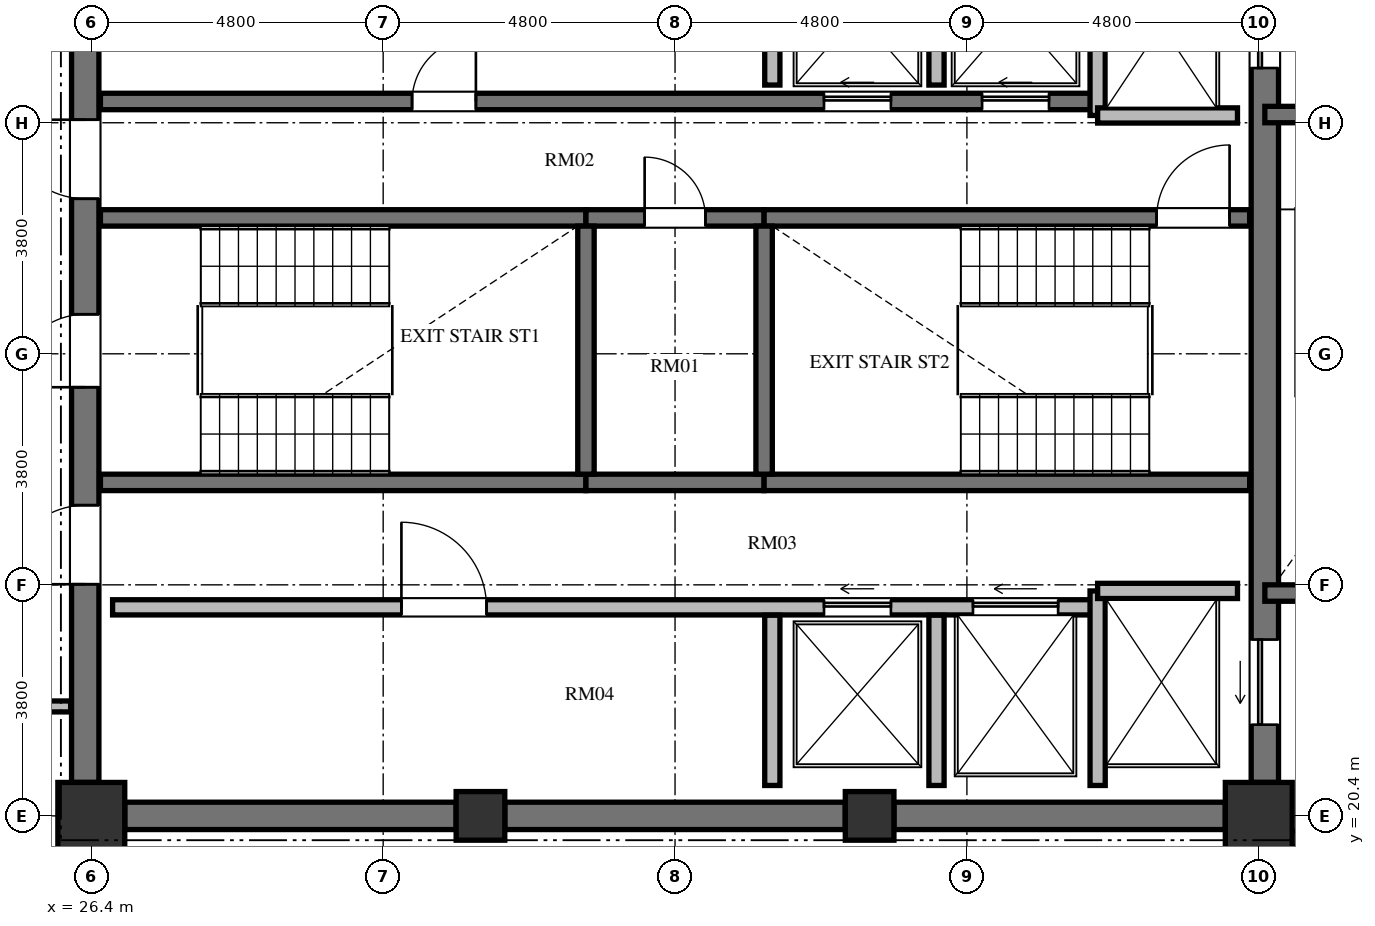
"""IFC4 building model, lengths in metres.
Left out: names, types, materials, properties, quantities, classifications, styles, units other than length and angle.
Written with IfcOpenShell. Run it as: python <this file> out.ifc"""

import sys

from ifc_helpers import new_model, si_unit, direction, frame, frame_2d, origin, origin_2d, place, context, subcontext, project, spatial, rectangle, extrude, element, fill, save


model = new_model("IFC4")
c1 = context("Model", 3, precision=1e-05, world=origin(), true_north=direction((0.0, 1.0)))
c2 = subcontext(c1, "Body", "Model", "MODEL_VIEW")
j1 = project(units=[si_unit("LENGTHUNIT", "METRE"), si_unit("PLANEANGLEUNIT", "RADIAN")], contexts=[c1])
p1 = place(None, origin())
s1 = spatial("IfcSite", under=j1, at=p1, CompositionType="ELEMENT")
p2 = place(p1, origin())
s2 = spatial("IfcBuilding", under=s1, at=p2, CompositionType="ELEMENT")
p3 = place(p2, frame((0.0, 0.0, 287.856)))
s3 = spatial("IfcBuildingStorey", under=s2, at=p3, CompositionType="ELEMENT", Elevation=287.856)
p4 = place(p3, frame((26.4, 20.4, 0.0), z_axis=(0.0, 0.0, 1.0), x_axis=(1.0, 0.0, 0.0)))
e1 = element("IfcColumn", 1, at=p4, inside=s3, PredefinedType="COLUMN", context=c2, shape_type="SweptSolid", body=[
    extrude(rectangle(XDim=1.1, YDim=1.1, at=origin_2d()), origin(), (0.0, 0.0, 1.0), 3.648),
])
for number, where, z_axis, x_axis in (
    (2, (32.8, 20.4, 0.0), (0.0, 0.0, 1.0), (1.0, 0.0, 0.0)),
    (3, (39.2, 20.4, 0.0), (0.0, 0.0, 1.0), (1.0, 0.0, 0.0)),
):
    element("IfcColumn", number, at=place(p3, frame(where, z_axis=z_axis, x_axis=x_axis)), inside=s3, PredefinedType="COLUMN", context=c2, shape_type="SweptSolid", body=[
        extrude(rectangle(XDim=0.8, YDim=0.8, at=origin_2d()), origin(), (0.0, 0.0, 1.0), 3.648),
    ])
p5 = place(p3, frame((45.6, 20.4, 0.0), z_axis=(0.0, 0.0, 1.0), x_axis=(1.0, 0.0, 0.0)))
e4 = element("IfcColumn", 4, at=p5, inside=s3, PredefinedType="COLUMN", context=c2, shape_type="SweptSolid", body=[
    extrude(rectangle(XDim=1.1, YDim=1.1, at=origin_2d()), origin(), (0.0, 0.0, 1.0), 3.648),
])
p6 = place(p3, frame((26.3, 20.95, 0.0), z_axis=(0.0, 0.0, 1.0), x_axis=(0.0, 1.0, 0.0)))
e5 = element("IfcWall", 5, at=p6, inside=s3, PredefinedType="SHEAR", context=c2, shape_type="SweptSolid", body=[
    extrude(rectangle(XDim=14.1, YDim=0.45, at=frame_2d((7.05, 0.0))), origin(), (0.0, 0.0, 1.0), 3.648),
])
p7 = place(p6, frame((6.5, 0.0, 0.0)))
e6 = element("IfcOpeningElement", 6, at=p7, cuts=e5, PredefinedType="OPENING", context=c2, shape_type="SweptSolid", body=[
    extrude(rectangle(XDim=1.2, YDim=2.15, at=frame_2d((0.6, 1.075))), frame((0.0, 0.235, 0.0), z_axis=(0.0, -1.0, 0.0), x_axis=(1.0, 0.0, 0.0)), (0.0, 0.0, 1.0), 0.47),
])
p8 = place(p6, frame((9.6, 0.0, 0.0)))
e7 = element("IfcOpeningElement", 7, at=p8, cuts=e5, PredefinedType="OPENING", context=c2, shape_type="SweptSolid", body=[
    extrude(rectangle(XDim=1.3, YDim=2.2, at=frame_2d((0.65, 1.1))), frame((0.0, 0.235, 0.0), z_axis=(0.0, -1.0, 0.0), x_axis=(1.0, 0.0, 0.0)), (0.0, 0.0, 1.0), 0.47),
])
p9 = place(p6, frame((3.26, 0.0, 0.0)))
e8 = element("IfcOpeningElement", 8, at=p9, cuts=e5, PredefinedType="OPENING", context=c2, shape_type="SweptSolid", body=[
    extrude(rectangle(XDim=1.3, YDim=2.2, at=frame_2d((0.65, 1.1))), frame((0.0, 0.235, 0.0), z_axis=(0.0, -1.0, 0.0), x_axis=(1.0, 0.0, 0.0)), (0.0, 0.0, 1.0), 0.47),
])
p10 = place(p3, frame((45.7, 20.95, 0.0), z_axis=(0.0, 0.0, 1.0), x_axis=(0.0, 1.0, 0.0)))
e9 = element("IfcWall", 9, at=p10, inside=s3, PredefinedType="SHEAR", context=c2, shape_type="SweptSolid", body=[
    extrude(rectangle(XDim=14.1, YDim=0.45, at=frame_2d((7.05, 0.0))), origin(), (0.0, 0.0, 1.0), 3.648),
])
p11 = place(p10, frame((11.75, 0.0, 0.0)))
e10 = element("IfcOpeningElement", 10, at=p11, cuts=e9, PredefinedType="OPENING", context=c2, shape_type="SweptSolid", body=[
    extrude(rectangle(XDim=1.4, YDim=2.3, at=frame_2d((0.7, 1.15))), frame((0.0, 0.235, 0.0), z_axis=(0.0, -1.0, 0.0), x_axis=(1.0, 0.0, 0.0)), (0.0, 0.0, 1.0), 0.47),
])
p12 = place(p10, frame((0.95, 0.0, 0.0)))
e11 = element("IfcOpeningElement", 11, at=p12, cuts=e9, PredefinedType="OPENING", context=c2, shape_type="SweptSolid", body=[
    extrude(rectangle(XDim=1.4, YDim=2.3, at=frame_2d((0.7, 1.15))), frame((0.0, 0.235, 0.0), z_axis=(0.0, -1.0, 0.0), x_axis=(1.0, 0.0, 0.0)), (0.0, 0.0, 1.0), 0.47),
])
p13 = place(p3, frame((26.95, 20.4, 0.0), z_axis=(0.0, 0.0, 1.0), x_axis=(1.0, 0.0, 0.0)))
e12 = element("IfcWall", 12, at=p13, inside=s3, PredefinedType="SHEAR", context=c2, shape_type="SweptSolid", body=[
    extrude(rectangle(XDim=5.45, YDim=0.45, at=frame_2d((2.725, 0.0))), origin(), (0.0, 0.0, 1.0), 3.648),
])
p14 = place(p3, frame((33.2, 20.4, 0.0), z_axis=(0.0, 0.0, 1.0), x_axis=(1.0, 0.0, 0.0)))
e13 = element("IfcWall", 13, at=p14, inside=s3, PredefinedType="SHEAR", context=c2, shape_type="SweptSolid", body=[
    extrude(rectangle(XDim=5.6, YDim=0.45, at=frame_2d((2.8, 0.0))), origin(), (0.0, 0.0, 1.0), 3.648),
])
p15 = place(p3, frame((39.6, 20.4, 0.0), z_axis=(0.0, 0.0, 1.0), x_axis=(1.0, 0.0, 0.0)))
e14 = element("IfcWall", 14, at=p15, inside=s3, PredefinedType="SHEAR", context=c2, shape_type="SweptSolid", body=[
    extrude(rectangle(XDim=5.45, YDim=0.45, at=frame_2d((2.725, 0.0))), origin(), (0.0, 0.0, 1.0), 3.648),
])
p16 = place(p3, frame((26.55, 30.235, 0.0), z_axis=(0.0, 0.0, 1.0), x_axis=(1.0, 0.0, 0.0)))
e15 = element("IfcWall", 15, at=p16, inside=s3, PredefinedType="SHEAR", context=c2, shape_type="SweptSolid", body=[
    extrude(rectangle(XDim=7.985, YDim=0.27, at=frame_2d((3.992, 0.0))), origin(), (0.0, 0.0, 1.0), 3.648),
])
p17 = place(p3, frame((34.535, 30.235, 0.0), z_axis=(0.0, 0.0, 1.0), x_axis=(1.0, 0.0, 0.0)))
e16 = element("IfcWall", 16, at=p17, inside=s3, PredefinedType="SHEAR", context=c2, shape_type="SweptSolid", body=[
    extrude(rectangle(XDim=2.93, YDim=0.27, at=frame_2d((1.465, 0.0))), origin(), (0.0, 0.0, 1.0), 3.648),
])
p18 = place(p17, frame((0.965, 0.0, 0.0)))
e17 = element("IfcOpeningElement", 17, at=p18, cuts=e16, PredefinedType="OPENING", context=c2, shape_type="SweptSolid", body=[
    extrude(rectangle(XDim=1.0, YDim=2.1, at=frame_2d((0.5, 1.05))), frame((0.0, 0.145, 0.0), z_axis=(0.0, -1.0, 0.0), x_axis=(1.0, 0.0, 0.0)), (0.0, 0.0, 1.0), 0.29),
])
p19 = place(p3, frame((37.465, 30.235, 0.0), z_axis=(0.0, 0.0, 1.0), x_axis=(1.0, 0.0, 0.0)))
e18 = element("IfcWall", 18, at=p19, inside=s3, PredefinedType="SHEAR", context=c2, shape_type="SweptSolid", body=[
    extrude(rectangle(XDim=7.985, YDim=0.27, at=frame_2d((3.992, 0.0))), origin(), (0.0, 0.0, 1.0), 3.648),
])
p20 = place(p19, frame((6.455, 0.0, 0.0)))
e19 = element("IfcOpeningElement", 19, at=p20, cuts=e18, PredefinedType="OPENING", context=c2, shape_type="SweptSolid", body=[
    extrude(rectangle(XDim=1.2, YDim=2.15, at=frame_2d((0.6, 1.075))), frame((0.0, 0.145, 0.0), z_axis=(0.0, -1.0, 0.0), x_axis=(1.0, 0.0, 0.0)), (0.0, 0.0, 1.0), 0.29),
])
p21 = place(p3, frame((26.55, 25.885, 0.0), z_axis=(0.0, 0.0, 1.0), x_axis=(1.0, 0.0, 0.0)))
e20 = element("IfcWall", 20, at=p21, inside=s3, PredefinedType="SHEAR", context=c2, shape_type="SweptSolid", body=[
    extrude(rectangle(XDim=7.985, YDim=0.27, at=frame_2d((3.992, 0.0))), origin(), (0.0, 0.0, 1.0), 3.648),
])
p22 = place(p3, frame((34.535, 25.885, 0.0), z_axis=(0.0, 0.0, 1.0), x_axis=(1.0, 0.0, 0.0)))
e21 = element("IfcWall", 21, at=p22, inside=s3, PredefinedType="SHEAR", context=c2, shape_type="SweptSolid", body=[
    extrude(rectangle(XDim=2.93, YDim=0.27, at=frame_2d((1.465, 0.0))), origin(), (0.0, 0.0, 1.0), 3.648),
])
p23 = place(p3, frame((37.465, 25.885, 0.0), z_axis=(0.0, 0.0, 1.0), x_axis=(1.0, 0.0, 0.0)))
e22 = element("IfcWall", 22, at=p23, inside=s3, PredefinedType="SHEAR", context=c2, shape_type="SweptSolid", body=[
    extrude(rectangle(XDim=7.985, YDim=0.27, at=frame_2d((3.992, 0.0))), origin(), (0.0, 0.0, 1.0), 3.648),
])
for number, where, z_axis, x_axis in (
    (23, (34.535, 26.02, 0.0), (0.0, 0.0, 1.0), (0.0, 1.0, 0.0)),
    (24, (37.465, 26.02, 0.0), (0.0, 0.0, 1.0), (0.0, 1.0, 0.0)),
):
    element("IfcWall", number, at=place(p3, frame(where, z_axis=z_axis, x_axis=x_axis)), inside=s3, PredefinedType="SHEAR", context=c2, shape_type="SweptSolid", body=[
        extrude(rectangle(XDim=4.08, YDim=0.27, at=frame_2d((2.04, 0.0))), origin(), (0.0, 0.0, 1.0), 3.648),
    ])
p24 = place(p3, frame((26.55, 32.15, 0.0), z_axis=(0.0, 0.0, 1.0), x_axis=(1.0, 0.0, 0.0)))
e25 = element("IfcWall", 25, at=p24, inside=s3, PredefinedType="SHEAR", context=c2, shape_type="SweptSolid", body=[
    extrude(rectangle(XDim=16.4, YDim=0.27, at=frame_2d((8.2, 0.0))), origin(), (0.0, 0.0, 1.0), 3.648),
])
p25 = place(p24, frame((5.125, 0.0, 0.0)))
e26 = element("IfcOpeningElement", 26, at=p25, cuts=e25, PredefinedType="OPENING", context=c2, shape_type="SweptSolid", body=[
    extrude(rectangle(XDim=1.05, YDim=2.15, at=frame_2d((0.525, 1.075))), frame((0.0, 0.145, 0.0), z_axis=(0.0, -1.0, 0.0), x_axis=(1.0, 0.0, 0.0)), (0.0, 0.0, 1.0), 0.29),
])
p26 = place(p24, frame((11.9, 0.0, 0.0)))
e27 = element("IfcOpeningElement", 27, at=p26, cuts=e25, PredefinedType="OPENING", context=c2, shape_type="SweptSolid", body=[
    extrude(rectangle(XDim=1.1, YDim=2.2, at=frame_2d((0.55, 1.1))), frame((0.0, 0.145, 0.0), z_axis=(0.0, -1.0, 0.0), x_axis=(1.0, 0.0, 0.0)), (0.0, 0.0, 1.0), 0.29),
])
p27 = place(p24, frame((14.5, 0.0, 0.0)))
e28 = element("IfcOpeningElement", 28, at=p27, cuts=e25, PredefinedType="OPENING", context=c2, shape_type="SweptSolid", body=[
    extrude(rectangle(XDim=1.1, YDim=2.2, at=frame_2d((0.55, 1.1))), frame((0.0, 0.145, 0.0), z_axis=(0.0, -1.0, 0.0), x_axis=(1.0, 0.0, 0.0)), (0.0, 0.0, 1.0), 0.29),
])
p28 = place(p3, frame((26.75, 23.83, 0.0), z_axis=(0.0, 0.0, 1.0), x_axis=(1.0, 0.0, 0.0)))
e29 = element("IfcWall", 29, at=p28, inside=s3, PredefinedType="SOLIDWALL", context=c2, shape_type="SweptSolid", body=[
    extrude(rectangle(XDim=16.2, YDim=0.25, at=frame_2d((8.1, 0.0))), origin(), (0.0, 0.0, 1.0), 3.448),
])
p29 = place(p28, frame((4.75, 0.0, 0.0)))
e30 = element("IfcOpeningElement", 30, at=p29, cuts=e29, PredefinedType="OPENING", context=c2, shape_type="SweptSolid", body=[
    extrude(rectangle(XDim=1.4, YDim=2.2, at=frame_2d((0.7, 1.1))), frame((0.0, 0.135, 0.0), z_axis=(0.0, -1.0, 0.0), x_axis=(1.0, 0.0, 0.0)), (0.0, 0.0, 1.0), 0.27),
])
p30 = place(p28, frame((11.7, 0.0, 0.0)))
e31 = element("IfcOpeningElement", 31, at=p30, cuts=e29, PredefinedType="OPENING", context=c2, shape_type="SweptSolid", body=[
    extrude(rectangle(XDim=1.1, YDim=2.2, at=frame_2d((0.55, 1.1))), frame((0.0, 0.135, 0.0), z_axis=(0.0, -1.0, 0.0), x_axis=(1.0, 0.0, 0.0)), (0.0, 0.0, 1.0), 0.27),
])
p31 = place(p28, frame((14.15, 0.0, 0.0)))
e32 = element("IfcOpeningElement", 32, at=p31, cuts=e29, PredefinedType="OPENING", context=c2, shape_type="SweptSolid", body=[
    extrude(rectangle(XDim=1.4, YDim=2.3, at=frame_2d((0.7, 1.15))), frame((0.0, 0.135, 0.0), z_axis=(0.0, -1.0, 0.0), x_axis=(1.0, 0.0, 0.0)), (0.0, 0.0, 1.0), 0.27),
])
p32 = place(p3, frame((42.95, 31.92, 0.0), z_axis=(0.0, 0.0, 1.0), x_axis=(0.0, 1.0, 0.0)))
e33 = element("IfcWall", 33, at=p32, inside=s3, PredefinedType="SOLIDWALL", context=c2, shape_type="SweptSolid", body=[
    extrude(rectangle(XDim=3.18, YDim=0.25, at=frame_2d((1.59, 0.0))), origin(), (0.0, 0.0, 1.0), 3.448),
])
p33 = place(p3, frame((42.95, 31.92, 0.0), z_axis=(0.0, 0.0, 1.0), x_axis=(1.0, 0.0, 0.0)))
e34 = element("IfcWall", 34, at=p33, inside=s3, PredefinedType="SOLIDWALL", context=c2, shape_type="SweptSolid", body=[
    extrude(rectangle(XDim=2.3, YDim=0.25, at=frame_2d((1.15, 0.0))), origin(), (0.0, 0.0, 1.0), 3.448),
])
p34 = place(p3, frame((42.95, 20.9, 0.0), z_axis=(0.0, 0.0, 1.0), x_axis=(0.0, 1.0, 0.0)))
e35 = element("IfcWall", 35, at=p34, inside=s3, PredefinedType="SOLIDWALL", context=c2, shape_type="SweptSolid", body=[
    extrude(rectangle(XDim=3.2, YDim=0.25, at=frame_2d((1.6, 0.0))), origin(), (0.0, 0.0, 1.0), 3.448),
])
p35 = place(p3, frame((42.95, 24.1, 0.0), z_axis=(0.0, 0.0, 1.0), x_axis=(1.0, 0.0, 0.0)))
e36 = element("IfcWall", 36, at=p35, inside=s3, PredefinedType="SOLIDWALL", context=c2, shape_type="SweptSolid", body=[
    extrude(rectangle(XDim=2.3, YDim=0.25, at=frame_2d((1.15, 0.0))), origin(), (0.0, 0.0, 1.0), 3.448),
])
p36 = place(p3, frame((37.6, 32.42, 0.0), z_axis=(0.0, 0.0, 1.0), x_axis=(0.0, 1.0, 0.0)))
e37 = element("IfcWall", 37, at=p36, inside=s3, PredefinedType="SOLIDWALL", context=c2, shape_type="SweptSolid", body=[
    extrude(rectangle(XDim=2.68, YDim=0.25, at=frame_2d((1.34, 0.0))), origin(), (0.0, 0.0, 1.0), 3.448),
])
p37 = place(p3, frame((37.6, 20.9, 0.0), z_axis=(0.0, 0.0, 1.0), x_axis=(0.0, 1.0, 0.0)))
e38 = element("IfcWall", 38, at=p37, inside=s3, PredefinedType="SOLIDWALL", context=c2, shape_type="SweptSolid", body=[
    extrude(rectangle(XDim=2.8, YDim=0.25, at=frame_2d((1.4, 0.0))), origin(), (0.0, 0.0, 1.0), 3.448),
])
p38 = place(p3, frame((40.3, 32.42, 0.0), z_axis=(0.0, 0.0, 1.0), x_axis=(0.0, 1.0, 0.0)))
e39 = element("IfcWall", 39, at=p38, inside=s3, PredefinedType="SOLIDWALL", context=c2, shape_type="SweptSolid", body=[
    extrude(rectangle(XDim=2.68, YDim=0.25, at=frame_2d((1.34, 0.0))), origin(), (0.0, 0.0, 1.0), 3.448),
])
p39 = place(p3, frame((40.3, 20.9, 0.0), z_axis=(0.0, 0.0, 1.0), x_axis=(0.0, 1.0, 0.0)))
e40 = element("IfcWall", 40, at=p39, inside=s3, PredefinedType="SOLIDWALL", context=c2, shape_type="SweptSolid", body=[
    extrude(rectangle(XDim=2.8, YDim=0.25, at=frame_2d((1.4, 0.0))), origin(), (0.0, 0.0, 1.0), 3.448),
])
for number, where, z_axis, x_axis in (
    (41, (45.7, 31.935, 0.0), (0.0, 0.0, 1.0), (1.0, 0.0, 0.0)),
    (42, (45.7, 24.065, 0.0), (0.0, 0.0, 1.0), (1.0, 0.0, 0.0)),
):
    element("IfcWall", number, at=place(p3, frame(where, z_axis=z_axis, x_axis=x_axis)), inside=s3, PredefinedType="SHEAR", context=c2, shape_type="SweptSolid", body=[
        extrude(rectangle(XDim=4.715, YDim=0.27, at=frame_2d((2.357, 0.0))), origin(), (0.0, 0.0, 1.0), 3.648),
    ])
p40 = place(p3, frame((45.7, 20.02, 0.0), z_axis=(0.0, 0.0, 1.0), x_axis=(1.0, 0.0, 0.0)))
e43 = element("IfcWall", 43, at=p40, inside=s3, PredefinedType="SOLIDWALL", context=c2, shape_type="SweptSolid", body=[
    extrude(rectangle(XDim=4.715, YDim=0.25, at=frame_2d((2.357, 0.0))), origin(), (0.0, 0.0, 1.0), 3.448),
])
p41 = place(p3, frame((26.06, 22.2, 0.0), z_axis=(0.0, 0.0, 1.0), x_axis=(-1.0, 0.0, 0.0)))
e44 = element("IfcWall", 44, at=p41, inside=s3, PredefinedType="PARTITIONING", context=c2, shape_type="SweptSolid", body=[
    extrude(rectangle(XDim=2.35, YDim=0.18, at=frame_2d((1.175, 0.0))), origin(), (0.0, 0.0, 1.0), 3.448),
])
p42 = place(p7, origin())
e45 = element("IfcDoor", 45, at=p42, inside=s3, OperationType="SINGLE_SWING_LEFT", PredefinedType="DOOR", context=c2, shape_type="SweptSolid", body=[
    extrude(rectangle(XDim=1.2, YDim=2.15, at=frame_2d((0.6, 1.075))), frame((0.0, 0.025, 0.0), z_axis=(0.0, -1.0, 0.0), x_axis=(1.0, 0.0, 0.0)), (0.0, 0.0, 1.0), 0.05),
])
fill(e6, e45)
p43 = place(p20, origin())
e46 = element("IfcDoor", 46, at=p43, inside=s3, OperationType="SINGLE_SWING_RIGHT", PredefinedType="DOOR", context=c2, shape_type="SweptSolid", body=[
    extrude(rectangle(XDim=1.2, YDim=2.15, at=frame_2d((0.6, 1.075))), frame((0.0, 0.025, 0.0), z_axis=(0.0, -1.0, 0.0), x_axis=(1.0, 0.0, 0.0)), (0.0, 0.0, 1.0), 0.05),
])
fill(e19, e46)
p44 = place(p18, origin())
e47 = element("IfcDoor", 47, at=p44, inside=s3, OperationType="SINGLE_SWING_LEFT", PredefinedType="DOOR", context=c2, shape_type="SweptSolid", body=[
    extrude(rectangle(XDim=1.0, YDim=2.1, at=frame_2d((0.5, 1.05))), frame((0.0, 0.025, 0.0), z_axis=(0.0, -1.0, 0.0), x_axis=(1.0, 0.0, 0.0)), (0.0, 0.0, 1.0), 0.05),
])
fill(e17, e47)
p45 = place(p8, origin())
e48 = element("IfcDoor", 48, at=p45, inside=s3, OperationType="SINGLE_SWING_RIGHT", PredefinedType="DOOR", context=c2, shape_type="SweptSolid", body=[
    extrude(rectangle(XDim=1.3, YDim=2.2, at=frame_2d((0.65, 1.1))), frame((0.0, 0.025, 0.0), z_axis=(0.0, -1.0, 0.0), x_axis=(1.0, 0.0, 0.0)), (0.0, 0.0, 1.0), 0.05),
])
fill(e7, e48)
p46 = place(p9, origin())
e49 = element("IfcDoor", 49, at=p46, inside=s3, OperationType="SINGLE_SWING_LEFT", PredefinedType="DOOR", context=c2, shape_type="SweptSolid", body=[
    extrude(rectangle(XDim=1.3, YDim=2.2, at=frame_2d((0.65, 1.1))), frame((0.0, 0.025, 0.0), z_axis=(0.0, -1.0, 0.0), x_axis=(1.0, 0.0, 0.0)), (0.0, 0.0, 1.0), 0.05),
])
fill(e8, e49)
p47 = place(p25, origin())
e50 = element("IfcDoor", 50, at=p47, inside=s3, OperationType="SINGLE_SWING_RIGHT", PredefinedType="DOOR", context=c2, shape_type="SweptSolid", body=[
    extrude(rectangle(XDim=1.05, YDim=2.15, at=frame_2d((0.525, 1.075))), frame((0.0, 0.025, 0.0), z_axis=(0.0, -1.0, 0.0), x_axis=(1.0, 0.0, 0.0)), (0.0, 0.0, 1.0), 0.05),
])
fill(e26, e50)
p48 = place(p29, origin())
e51 = element("IfcDoor", 51, at=p48, inside=s3, OperationType="SINGLE_SWING_LEFT", PredefinedType="DOOR", context=c2, shape_type="SweptSolid", body=[
    extrude(rectangle(XDim=1.4, YDim=2.2, at=frame_2d((0.7, 1.1))), frame((0.0, 0.025, 0.0), z_axis=(0.0, -1.0, 0.0), x_axis=(1.0, 0.0, 0.0)), (0.0, 0.0, 1.0), 0.05),
])
fill(e30, e51)
p49 = place(p26, origin())
e52 = element("IfcDoor", 52, at=p49, inside=s3, OperationType="SLIDING_TO_LEFT", PredefinedType="DOOR", context=c2, shape_type="SweptSolid", body=[
    extrude(rectangle(XDim=1.1, YDim=2.2, at=frame_2d((0.55, 1.1))), frame((0.0, 0.025, 0.0), z_axis=(0.0, -1.0, 0.0), x_axis=(1.0, 0.0, 0.0)), (0.0, 0.0, 1.0), 0.05),
])
fill(e27, e52)
p50 = place(p27, origin())
e53 = element("IfcDoor", 53, at=p50, inside=s3, OperationType="SLIDING_TO_LEFT", PredefinedType="DOOR", context=c2, shape_type="SweptSolid", body=[
    extrude(rectangle(XDim=1.1, YDim=2.2, at=frame_2d((0.55, 1.1))), frame((0.0, 0.025, 0.0), z_axis=(0.0, -1.0, 0.0), x_axis=(1.0, 0.0, 0.0)), (0.0, 0.0, 1.0), 0.05),
])
fill(e28, e53)
p51 = place(p30, origin())
e54 = element("IfcDoor", 54, at=p51, inside=s3, OperationType="SLIDING_TO_LEFT", PredefinedType="DOOR", context=c2, shape_type="SweptSolid", body=[
    extrude(rectangle(XDim=1.1, YDim=2.2, at=frame_2d((0.55, 1.1))), frame((0.0, 0.025, 0.0), z_axis=(0.0, -1.0, 0.0), x_axis=(1.0, 0.0, 0.0)), (0.0, 0.0, 1.0), 0.05),
])
fill(e31, e54)
p52 = place(p11, origin())
e55 = element("IfcDoor", 55, at=p52, inside=s3, OperationType="SLIDING_TO_LEFT", PredefinedType="DOOR", context=c2, shape_type="SweptSolid", body=[
    extrude(rectangle(XDim=1.4, YDim=2.3, at=frame_2d((0.7, 1.15))), frame((0.0, 0.025, 0.0), z_axis=(0.0, -1.0, 0.0), x_axis=(1.0, 0.0, 0.0)), (0.0, 0.0, 1.0), 0.05),
])
fill(e10, e55)
p53 = place(p12, origin())
e56 = element("IfcDoor", 56, at=p53, inside=s3, OperationType="SLIDING_TO_LEFT", PredefinedType="DOOR", context=c2, shape_type="SweptSolid", body=[
    extrude(rectangle(XDim=1.4, YDim=2.3, at=frame_2d((0.7, 1.15))), frame((0.0, 0.025, 0.0), z_axis=(0.0, -1.0, 0.0), x_axis=(1.0, 0.0, 0.0)), (0.0, 0.0, 1.0), 0.05),
])
fill(e11, e56)
p54 = place(p31, origin())
e57 = element("IfcDoor", 57, at=p54, inside=s3, OperationType="SLIDING_TO_LEFT", PredefinedType="DOOR", context=c2, shape_type="SweptSolid", body=[
    extrude(rectangle(XDim=1.4, YDim=2.3, at=frame_2d((0.7, 1.15))), frame((0.0, 0.025, 0.0), z_axis=(0.0, -1.0, 0.0), x_axis=(1.0, 0.0, 0.0)), (0.0, 0.0, 1.0), 0.05),
])
fill(e32, e57)
save(model, sys.argv[1])
